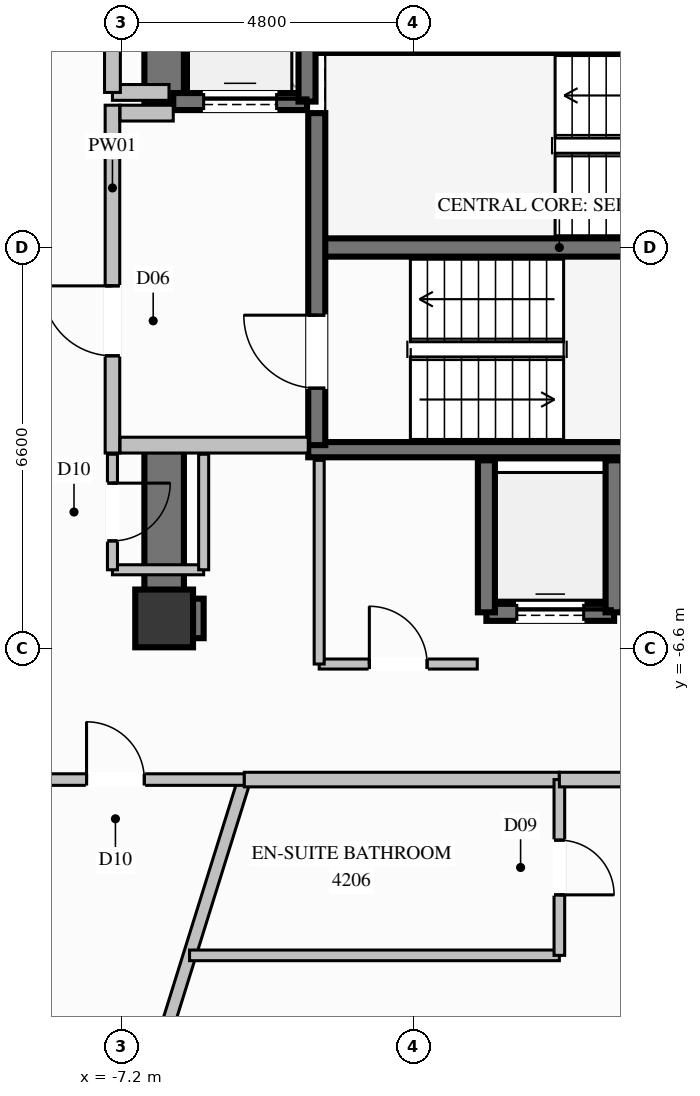
"""IFC4 building model, lengths in metres.
Left out: names, types, materials, properties, quantities, classifications, styles, units other than length and angle.
Written with IfcOpenShell. Run it as: python <this file> out.ifc"""

import sys

from ifc_helpers import new_model, si_unit, direction, frame, frame_2d, origin, origin_2d, place, context, subcontext, project, spatial, rectangle, extrude, element, fill, save


model = new_model("IFC4")
c1 = context("Model", 3, precision=1e-05, world=origin(), true_north=direction((0.0, 1.0)))
c2 = subcontext(c1, "Body", "Model", "MODEL_VIEW")
j1 = project(units=[si_unit("LENGTHUNIT", "METRE"), si_unit("PLANEANGLEUNIT", "RADIAN")], contexts=[c1])
p1 = place(None, origin())
s1 = spatial("IfcSite", under=j1, at=p1, CompositionType="ELEMENT")
p2 = place(p1, origin())
s2 = spatial("IfcBuilding", under=s1, at=p2, CompositionType="ELEMENT")
p3 = place(p2, frame((0.0, 0.0, 156.6)))
s3 = spatial("IfcBuildingStorey", under=s2, at=p3, CompositionType="ELEMENT", Elevation=156.6)
p4 = place(p3, frame((-6.5, -6.1, 0.0), z_axis=(0.0, 0.0, 1.0), x_axis=(1.0, 0.0, 0.0)))
e1 = element("IfcColumn", 1, at=p4, inside=s3, PredefinedType="COLUMN", context=c2, shape_type="SweptSolid", body=[
    extrude(rectangle(XDim=0.95, YDim=0.95, at=origin_2d()), origin(), (0.0, 0.0, 1.0), 3.6),
])
p5 = place(p3, frame((-3.99, 0.0, 0.0), z_axis=(0.0, 0.0, 1.0), x_axis=(1.0, 0.0, 0.0)))
e2 = element("IfcWall", 2, at=p5, inside=s3, PredefinedType="SHEAR", context=c2, shape_type="SweptSolid", body=[
    extrude(rectangle(XDim=7.98, YDim=0.3, at=frame_2d((3.99, 0.0))), origin(), (0.0, 0.0, 1.0), 3.6),
])
for number, where, z_axis, x_axis in (
    (3, (-4.13, -3.325, 0.0), (0.0, 0.0, 1.0), (1.0, 0.0, 0.0)),
    (4, (-4.13, 3.325, 0.0), (0.0, 0.0, 1.0), (1.0, 0.0, 0.0)),
):
    element("IfcWall", number, at=place(p3, frame(where, z_axis=z_axis, x_axis=x_axis)), inside=s3, PredefinedType="SOLIDWALL", context=c2, shape_type="SweptSolid", body=[
        extrude(rectangle(XDim=8.26, YDim=0.25, at=frame_2d((4.13, 0.0))), origin(), (0.0, 0.0, 1.0), 3.6),
    ])
p6 = place(p3, frame((-6.175, -6.1, 0.0), z_axis=(0.0, 0.0, 1.0), x_axis=(1.0, 0.0, 0.0)))
e5 = element("IfcWall", 5, at=p6, inside=s3, PredefinedType="SHEAR", context=c2, shape_type="SweptSolid", body=[
    extrude(rectangle(XDim=0.325, YDim=0.65, at=frame_2d((0.163, 0.0))), origin(), (0.0, 0.0, 1.0), 3.6),
])
p7 = place(p3, frame((-6.5, 2.35, 0.0), z_axis=(0.0, 0.0, 1.0), x_axis=(0.0, 1.0, 0.0)))
e6 = element("IfcWall", 6, at=p7, inside=s3, PredefinedType="SHEAR", context=c2, shape_type="SweptSolid", body=[
    extrude(rectangle(XDim=4.075, YDim=0.65, at=frame_2d((2.038, 0.0))), origin(), (0.0, 0.0, 1.0), 3.6),
])
p8 = place(p3, frame((-6.5, -6.425, 0.0), z_axis=(0.0, 0.0, 1.0), x_axis=(0.0, 1.0, 0.0)))
e7 = element("IfcWall", 7, at=p8, inside=s3, PredefinedType="SHEAR", context=c2, shape_type="SweptSolid", body=[
    extrude(rectangle(XDim=3.075, YDim=0.65, at=frame_2d((1.538, 0.0))), origin(), (0.0, 0.0, 1.0), 3.6),
])
p9 = place(p3, frame((-1.2, -6.0, 0.0), z_axis=(0.0, 0.0, 1.0), x_axis=(1.0, 0.0, 0.0)))
e8 = element("IfcWall", 8, at=p9, inside=s3, PredefinedType="SOLIDWALL", context=c2, shape_type="SweptSolid", body=[
    extrude(rectangle(XDim=2.1, YDim=0.28, at=frame_2d((1.05, 0.0))), origin(), (0.0, 0.0, 1.0), 3.35),
])
p10 = place(p9, frame((0.5, 0.0, 0.0)))
e9 = element("IfcOpeningElement", 9, at=p10, cuts=e8, PredefinedType="OPENING", context=c2, shape_type="SweptSolid", body=[
    extrude(rectangle(XDim=1.1, YDim=2.2, at=frame_2d((0.55, 1.1))), frame((0.0, 0.15, 0.0), z_axis=(0.0, -1.0, 0.0), x_axis=(1.0, 0.0, 0.0)), (0.0, 0.0, 1.0), 0.3),
])
for number, where, z_axis, x_axis in (
    (10, (-1.2, -3.5, 0.0), (0.0, 0.0, 1.0), (0.0, -1.0, 0.0)),
    (11, (0.9, -6.0, 0.0), (0.0, 0.0, 1.0), (0.0, 1.0, 0.0)),
):
    element("IfcWall", number, at=place(p3, frame(where, z_axis=z_axis, x_axis=x_axis)), inside=s3, PredefinedType="SOLIDWALL", context=c2, shape_type="SweptSolid", body=[
        extrude(rectangle(XDim=2.5, YDim=0.28, at=frame_2d((1.25, 0.0))), origin(), (0.0, 0.0, 1.0), 3.35),
    ])
p11 = place(p3, frame((-6.35, 2.4, 0.0), z_axis=(0.0, 0.0, 1.0), x_axis=(1.0, 0.0, 0.0)))
e12 = element("IfcWall", 12, at=p11, inside=s3, PredefinedType="SOLIDWALL", context=c2, shape_type="SweptSolid", body=[
    extrude(rectangle(XDim=2.2, YDim=0.28, at=frame_2d((1.1, 0.0))), origin(), (0.0, 0.0, 1.0), 3.35),
])
p12 = place(p11, frame((0.5, 0.0, 0.0)))
e13 = element("IfcOpeningElement", 13, at=p12, cuts=e12, PredefinedType="OPENING", context=c2, shape_type="SweptSolid", body=[
    extrude(rectangle(XDim=1.2, YDim=2.2, at=frame_2d((0.6, 1.1))), frame((0.0, 0.15, 0.0), z_axis=(0.0, -1.0, 0.0), x_axis=(1.0, 0.0, 0.0)), (0.0, 0.0, 1.0), 0.3),
])
p13 = place(p3, frame((-4.15, 2.4, 0.0), z_axis=(0.0, 0.0, 1.0), x_axis=(0.0, 1.0, 0.0)))
e14 = element("IfcWall", 14, at=p13, inside=s3, PredefinedType="SOLIDWALL", context=c2, shape_type="SweptSolid", body=[
    extrude(rectangle(XDim=2.7, YDim=0.28, at=frame_2d((1.35, 0.0))), origin(), (0.0, 0.0, 1.0), 3.35),
])
p14 = place(p3, frame((-3.99, -3.25, 0.0), z_axis=(0.0, 0.0, 1.0), x_axis=(0.0, 1.0, 0.0)))
e15 = element("IfcWall", 15, at=p14, inside=s3, PredefinedType="SOLIDWALL", context=c2, shape_type="SweptSolid", body=[
    extrude(rectangle(XDim=5.46, YDim=0.28, at=frame_2d((2.73, 0.0))), origin(), (0.0, 0.0, 1.0), 3.35),
])
p15 = place(p14, frame((0.937, 0.0, 0.0)))
e16 = element("IfcOpeningElement", 16, at=p15, cuts=e15, PredefinedType="OPENING", context=c2, shape_type="SweptSolid", body=[
    extrude(rectangle(XDim=1.2, YDim=2.2, at=frame_2d((0.6, 1.1))), frame((0.0, 0.15, 0.0), z_axis=(0.0, -1.0, 0.0), x_axis=(1.0, 0.0, 0.0)), (0.0, 0.0, 1.0), 0.3),
])
p16 = place(p3, frame((-7.35, -3.38, 0.0), z_axis=(0.0, 0.0, 1.0), x_axis=(0.0, 1.0, 0.0)))
e17 = element("IfcWall", 17, at=p16, inside=s3, PredefinedType="PARTITIONING", context=c2, shape_type="SweptSolid", body=[
    extrude(rectangle(XDim=5.72, YDim=0.24, at=frame_2d((2.86, 0.0))), origin(), (0.0, 0.0, 1.0), 2.435),
])
p17 = place(p16, frame((1.599, 0.0, 0.0)))
e18 = element("IfcOpeningElement", 18, at=p17, cuts=e17, PredefinedType="OPENING", context=c2, shape_type="SweptSolid", body=[
    extrude(rectangle(XDim=1.15, YDim=2.2, at=frame_2d((0.575, 1.1))), frame((0.0, 0.13, 0.0), z_axis=(0.0, -1.0, 0.0), x_axis=(1.0, 0.0, 0.0)), (0.0, 0.0, 1.0), 0.26),
])
p18 = place(p3, frame((-7.225, -3.25, 0.0), z_axis=(0.0, 0.0, 1.0), x_axis=(1.0, 0.0, 0.0)))
e19 = element("IfcWall", 19, at=p18, inside=s3, PredefinedType="PARTITIONING", context=c2, shape_type="SweptSolid", body=[
    extrude(rectangle(XDim=3.095, YDim=0.26, at=frame_2d((1.548, 0.0))), origin(), (0.0, 0.0, 1.0), 3.35),
])
p19 = place(p3, frame((-7.225, 2.21, 0.0), z_axis=(0.0, 0.0, 1.0), x_axis=(1.0, 0.0, 0.0)))
e20 = element("IfcWall", 20, at=p19, inside=s3, PredefinedType="PARTITIONING", context=c2, shape_type="SweptSolid", body=[
    extrude(rectangle(XDim=0.875, YDim=0.26, at=frame_2d((0.438, 0.0))), origin(), (0.0, 0.0, 1.0), 3.35),
])
p20 = place(p3, frame((-7.35, 2.55, 0.0), z_axis=(0.0, 0.0, 1.0), x_axis=(1.0, 0.0, 0.0)))
e21 = element("IfcWall", 21, at=p20, inside=s3, PredefinedType="PARTITIONING", context=c2, shape_type="SweptSolid", body=[
    extrude(rectangle(XDim=0.93, YDim=0.26, at=frame_2d((0.465, 0.0))), origin(), (0.0, 0.0, 1.0), 3.35),
])
p21 = place(p3, frame((-7.35, 2.55, 0.0), z_axis=(0.0, 0.0, 1.0), x_axis=(0.0, 1.0, 0.0)))
e22 = element("IfcWall", 22, at=p21, inside=s3, PredefinedType="PARTITIONING", context=c2, shape_type="SweptSolid", body=[
    extrude(rectangle(XDim=2.4, YDim=0.26, at=frame_2d((1.2, 0.0))), origin(), (0.0, 0.0, 1.0), 2.435),
])
p22 = place(p21, frame((0.775, 0.0, 0.0)))
e23 = element("IfcOpeningElement", 23, at=p22, cuts=e22, PredefinedType="OPENING", context=c2, shape_type="SweptSolid", body=[
    extrude(rectangle(XDim=0.85, YDim=2.05, at=frame_2d((0.425, 1.025))), frame((0.0, 0.14, 0.0), z_axis=(0.0, -1.0, 0.0), x_axis=(1.0, 0.0, 0.0)), (0.0, 0.0, 1.0), 0.28),
])
p23 = place(p3, frame((-7.35, -5.3, 0.0), z_axis=(0.0, 0.0, 1.0), x_axis=(1.0, 0.0, 0.0)))
e24 = element("IfcWall", 24, at=p23, inside=s3, PredefinedType="PARTITIONING", context=c2, shape_type="SweptSolid", body=[
    extrude(rectangle(XDim=1.5, YDim=0.165, at=frame_2d((0.75, 0.0))), origin(), (0.0, 0.0, 1.0), 2.435),
])
p24 = place(p3, frame((-5.85, -5.3, 0.0), z_axis=(0.0, 0.0, 1.0), x_axis=(0.0, 1.0, 0.0)))
e25 = element("IfcWall", 25, at=p24, inside=s3, PredefinedType="PARTITIONING", context=c2, shape_type="SweptSolid", body=[
    extrude(rectangle(XDim=1.9, YDim=0.165, at=frame_2d((0.95, 0.0))), origin(), (0.0, 0.0, 1.0), 2.435),
])
p25 = place(p3, frame((-7.35, -3.4, 0.0), z_axis=(0.0, 0.0, 1.0), x_axis=(0.0, -1.0, 0.0)))
e26 = element("IfcWall", 26, at=p25, inside=s3, PredefinedType="PARTITIONING", context=c2, shape_type="SweptSolid", body=[
    extrude(rectangle(XDim=1.9, YDim=0.165, at=frame_2d((0.95, 0.0))), origin(), (0.0, 0.0, 1.0), 3.35),
])
p26 = place(p25, frame((0.475, 0.0, 0.0)))
e27 = element("IfcOpeningElement", 27, at=p26, cuts=e26, PredefinedType="OPENING", context=c2, shape_type="SweptSolid", body=[
    extrude(rectangle(XDim=0.95, YDim=2.1, at=frame_2d((0.475, 1.05))), frame((0.0, 0.093, 0.0), z_axis=(0.0, -1.0, 0.0), x_axis=(1.0, 0.0, 0.0)), (0.0, 0.0, 1.0), 0.185),
])
p27 = place(p3, frame((-3.95, -6.85, 0.0), z_axis=(0.0, 0.0, 1.0), x_axis=(1.0, 0.0, 0.0)))
e28 = element("IfcWall", 28, at=p27, inside=s3, PredefinedType="PARTITIONING", context=c2, shape_type="SweptSolid", body=[
    extrude(rectangle(XDim=2.6, YDim=0.165, at=frame_2d((1.3, 0.0))), origin(), (0.0, 0.0, 1.0), 2.435),
])
p28 = place(p27, frame((0.825, 0.0, 0.0)))
e29 = element("IfcOpeningElement", 29, at=p28, cuts=e28, PredefinedType="OPENING", context=c2, shape_type="SweptSolid", body=[
    extrude(rectangle(XDim=0.95, YDim=2.1, at=frame_2d((0.475, 1.05))), frame((0.0, 0.093, 0.0), z_axis=(0.0, -1.0, 0.0), x_axis=(1.0, 0.0, 0.0)), (0.0, 0.0, 1.0), 0.185),
])
p29 = place(p3, frame((-3.95, -3.5, 0.0), z_axis=(0.0, 0.0, 1.0), x_axis=(0.0, -1.0, 0.0)))
e30 = element("IfcWall", 30, at=p29, inside=s3, PredefinedType="PARTITIONING", context=c2, shape_type="SweptSolid", body=[
    extrude(rectangle(XDim=3.35, YDim=0.165, at=frame_2d((1.675, 0.0))), origin(), (0.0, 0.0, 1.0), 3.35),
])
p30 = place(p3, frame((-5.181, -8.75, 0.0), z_axis=(0.0, 0.0, 1.0), x_axis=(-0.297695182725, -0.954660975521, 0.0)))
e31 = element("IfcWall", 31, at=p30, inside=s3, PredefinedType="PARTITIONING", context=c2, shape_type="SweptSolid", body=[
    extrude(rectangle(XDim=10.095, YDim=0.21, at=frame_2d((5.047, 0.0))), origin(), (0.0, 0.0, 1.0), 3.35),
])
p31 = place(p3, frame((-9.42, -8.75, 0.0), z_axis=(0.0, 0.0, 1.0), x_axis=(1.0, 0.0, 0.0)))
e32 = element("IfcWall", 32, at=p31, inside=s3, PredefinedType="PARTITIONING", context=c2, shape_type="SweptSolid", body=[
    extrude(rectangle(XDim=4.239, YDim=0.19, at=frame_2d((2.12, 0.0))), origin(), (0.0, 0.0, 1.0), 3.35),
])
p32 = place(p31, frame((1.644, 0.0, 0.0)))
e33 = element("IfcOpeningElement", 33, at=p32, cuts=e32, PredefinedType="OPENING", context=c2, shape_type="SweptSolid", body=[
    extrude(rectangle(XDim=0.95, YDim=2.1, at=frame_2d((0.475, 1.05))), frame((0.0, 0.105, 0.0), z_axis=(0.0, -1.0, 0.0), x_axis=(1.0, 0.0, 0.0)), (0.0, 0.0, 1.0), 0.21),
])
p33 = place(p3, frame((-5.181, -8.75, 0.0), z_axis=(0.0, 0.0, 1.0), x_axis=(1.0, 0.0, 0.0)))
e34 = element("IfcWall", 34, at=p33, inside=s3, PredefinedType="PARTITIONING", context=c2, shape_type="SweptSolid", body=[
    extrude(rectangle(XDim=5.181, YDim=0.24, at=frame_2d((2.59, 0.0))), origin(), (0.0, 0.0, 1.0), 3.35),
])
p34 = place(p3, frame((-6.082, -11.641, 0.0), z_axis=(0.0, 0.0, 1.0), x_axis=(1.0, 0.0, 0.0)))
e35 = element("IfcWall", 35, at=p34, inside=s3, PredefinedType="PLUMBINGWALL", context=c2, shape_type="SweptSolid", body=[
    extrude(rectangle(XDim=6.082, YDim=0.175, at=frame_2d((3.041, 0.0))), origin(), (0.0, 0.0, 1.0), 3.35),
])
p35 = place(p3, frame((0.0, -8.75, 0.0), z_axis=(0.0, 0.0, 1.0), x_axis=(0.0, -1.0, 0.0)))
e36 = element("IfcWall", 36, at=p35, inside=s3, PredefinedType="PLUMBINGWALL", context=c2, shape_type="SweptSolid", body=[
    extrude(rectangle(XDim=2.891, YDim=0.175, at=frame_2d((1.446, 0.0))), origin(), (0.0, 0.0, 1.0), 3.35),
])
p36 = place(p35, frame((0.996, 0.0, 0.0)))
e37 = element("IfcOpeningElement", 37, at=p36, cuts=e36, PredefinedType="OPENING", context=c2, shape_type="SweptSolid", body=[
    extrude(rectangle(XDim=0.9, YDim=2.1, at=frame_2d((0.45, 1.05))), frame((0.0, 0.098, 0.0), z_axis=(0.0, -1.0, 0.0), x_axis=(1.0, 0.0, 0.0)), (0.0, 0.0, 1.0), 0.195),
])
p37 = place(p3, frame((0.0, -8.75, 0.0), z_axis=(0.0, 0.0, 1.0), x_axis=(1.0, 0.0, 0.0)))
e38 = element("IfcWall", 38, at=p37, inside=s3, PredefinedType="PARTITIONING", context=c2, shape_type="SweptSolid", body=[
    extrude(rectangle(XDim=5.346, YDim=0.24, at=frame_2d((2.673, 0.0))), origin(), (0.0, 0.0, 1.0), 3.35),
])
p38 = place(p37, frame((2.173, 0.0, 0.0)))
e39 = element("IfcOpeningElement", 39, at=p38, cuts=e38, PredefinedType="OPENING", context=c2, shape_type="SweptSolid", body=[
    extrude(rectangle(XDim=1.0, YDim=2.2, at=frame_2d((0.5, 1.1))), frame((0.0, 0.13, 0.0), z_axis=(0.0, -1.0, 0.0), x_axis=(1.0, 0.0, 0.0)), (0.0, 0.0, 1.0), 0.26),
])
p39 = place(p10, origin())
e40 = element("IfcDoor", 40, at=p39, inside=s3, OperationType="SLIDING_TO_LEFT", PredefinedType="DOOR", context=c2, shape_type="SweptSolid", body=[
    extrude(rectangle(XDim=1.1, YDim=2.2, at=frame_2d((0.55, 1.1))), frame((0.0, 0.025, 0.0), z_axis=(0.0, -1.0, 0.0), x_axis=(1.0, 0.0, 0.0)), (0.0, 0.0, 1.0), 0.05),
])
fill(e9, e40)
p40 = place(p12, origin())
e41 = element("IfcDoor", 41, at=p40, inside=s3, OperationType="SLIDING_TO_LEFT", PredefinedType="DOOR", context=c2, shape_type="SweptSolid", body=[
    extrude(rectangle(XDim=1.2, YDim=2.2, at=frame_2d((0.6, 1.1))), frame((0.0, 0.025, 0.0), z_axis=(0.0, -1.0, 0.0), x_axis=(1.0, 0.0, 0.0)), (0.0, 0.0, 1.0), 0.05),
])
fill(e13, e41)
p41 = place(p15, origin())
e42 = element("IfcDoor", 42, at=p41, inside=s3, OperationType="SINGLE_SWING_RIGHT", PredefinedType="DOOR", context=c2, shape_type="SweptSolid", body=[
    extrude(rectangle(XDim=1.2, YDim=2.2, at=frame_2d((0.6, 1.1))), frame((0.0, 0.025, 0.0), z_axis=(0.0, -1.0, 0.0), x_axis=(1.0, 0.0, 0.0)), (0.0, 0.0, 1.0), 0.05),
])
fill(e16, e42)
p42 = place(p17, origin())
e43 = element("IfcDoor", 43, at=p42, inside=s3, OperationType="SINGLE_SWING_RIGHT", PredefinedType="DOOR", context=c2, shape_type="SweptSolid", body=[
    extrude(rectangle(XDim=1.15, YDim=2.2, at=frame_2d((0.575, 1.1))), frame((0.0, 0.025, 0.0), z_axis=(0.0, -1.0, 0.0), x_axis=(1.0, 0.0, 0.0)), (0.0, 0.0, 1.0), 0.05),
])
fill(e18, e43)
p43 = place(p26, origin())
e44 = element("IfcDoor", 44, at=p43, inside=s3, OperationType="SINGLE_SWING_LEFT", PredefinedType="DOOR", context=c2, shape_type="SweptSolid", body=[
    extrude(rectangle(XDim=0.95, YDim=2.1, at=frame_2d((0.475, 1.05))), frame((0.0, 0.025, 0.0), z_axis=(0.0, -1.0, 0.0), x_axis=(1.0, 0.0, 0.0)), (0.0, 0.0, 1.0), 0.05),
])
fill(e27, e44)
p44 = place(p28, origin())
e45 = element("IfcDoor", 45, at=p44, inside=s3, OperationType="SINGLE_SWING_LEFT", PredefinedType="DOOR", context=c2, shape_type="SweptSolid", body=[
    extrude(rectangle(XDim=0.95, YDim=2.1, at=frame_2d((0.475, 1.05))), frame((0.0, 0.025, 0.0), z_axis=(0.0, -1.0, 0.0), x_axis=(1.0, 0.0, 0.0)), (0.0, 0.0, 1.0), 0.05),
])
fill(e29, e45)
p45 = place(p32, origin())
e46 = element("IfcDoor", 46, at=p45, inside=s3, OperationType="SINGLE_SWING_LEFT", PredefinedType="DOOR", context=c2, shape_type="SweptSolid", body=[
    extrude(rectangle(XDim=0.95, YDim=2.1, at=frame_2d((0.475, 1.05))), frame((0.0, 0.025, 0.0), z_axis=(0.0, -1.0, 0.0), x_axis=(1.0, 0.0, 0.0)), (0.0, 0.0, 1.0), 0.05),
])
fill(e33, e46)
p46 = place(p36, origin())
e47 = element("IfcDoor", 47, at=p46, inside=s3, OperationType="SINGLE_SWING_RIGHT", PredefinedType="DOOR", context=c2, shape_type="SweptSolid", body=[
    extrude(rectangle(XDim=0.9, YDim=2.1, at=frame_2d((0.45, 1.05))), frame((0.0, 0.025, 0.0), z_axis=(0.0, -1.0, 0.0), x_axis=(1.0, 0.0, 0.0)), (0.0, 0.0, 1.0), 0.05),
])
fill(e37, e47)
save(model, sys.argv[1])
